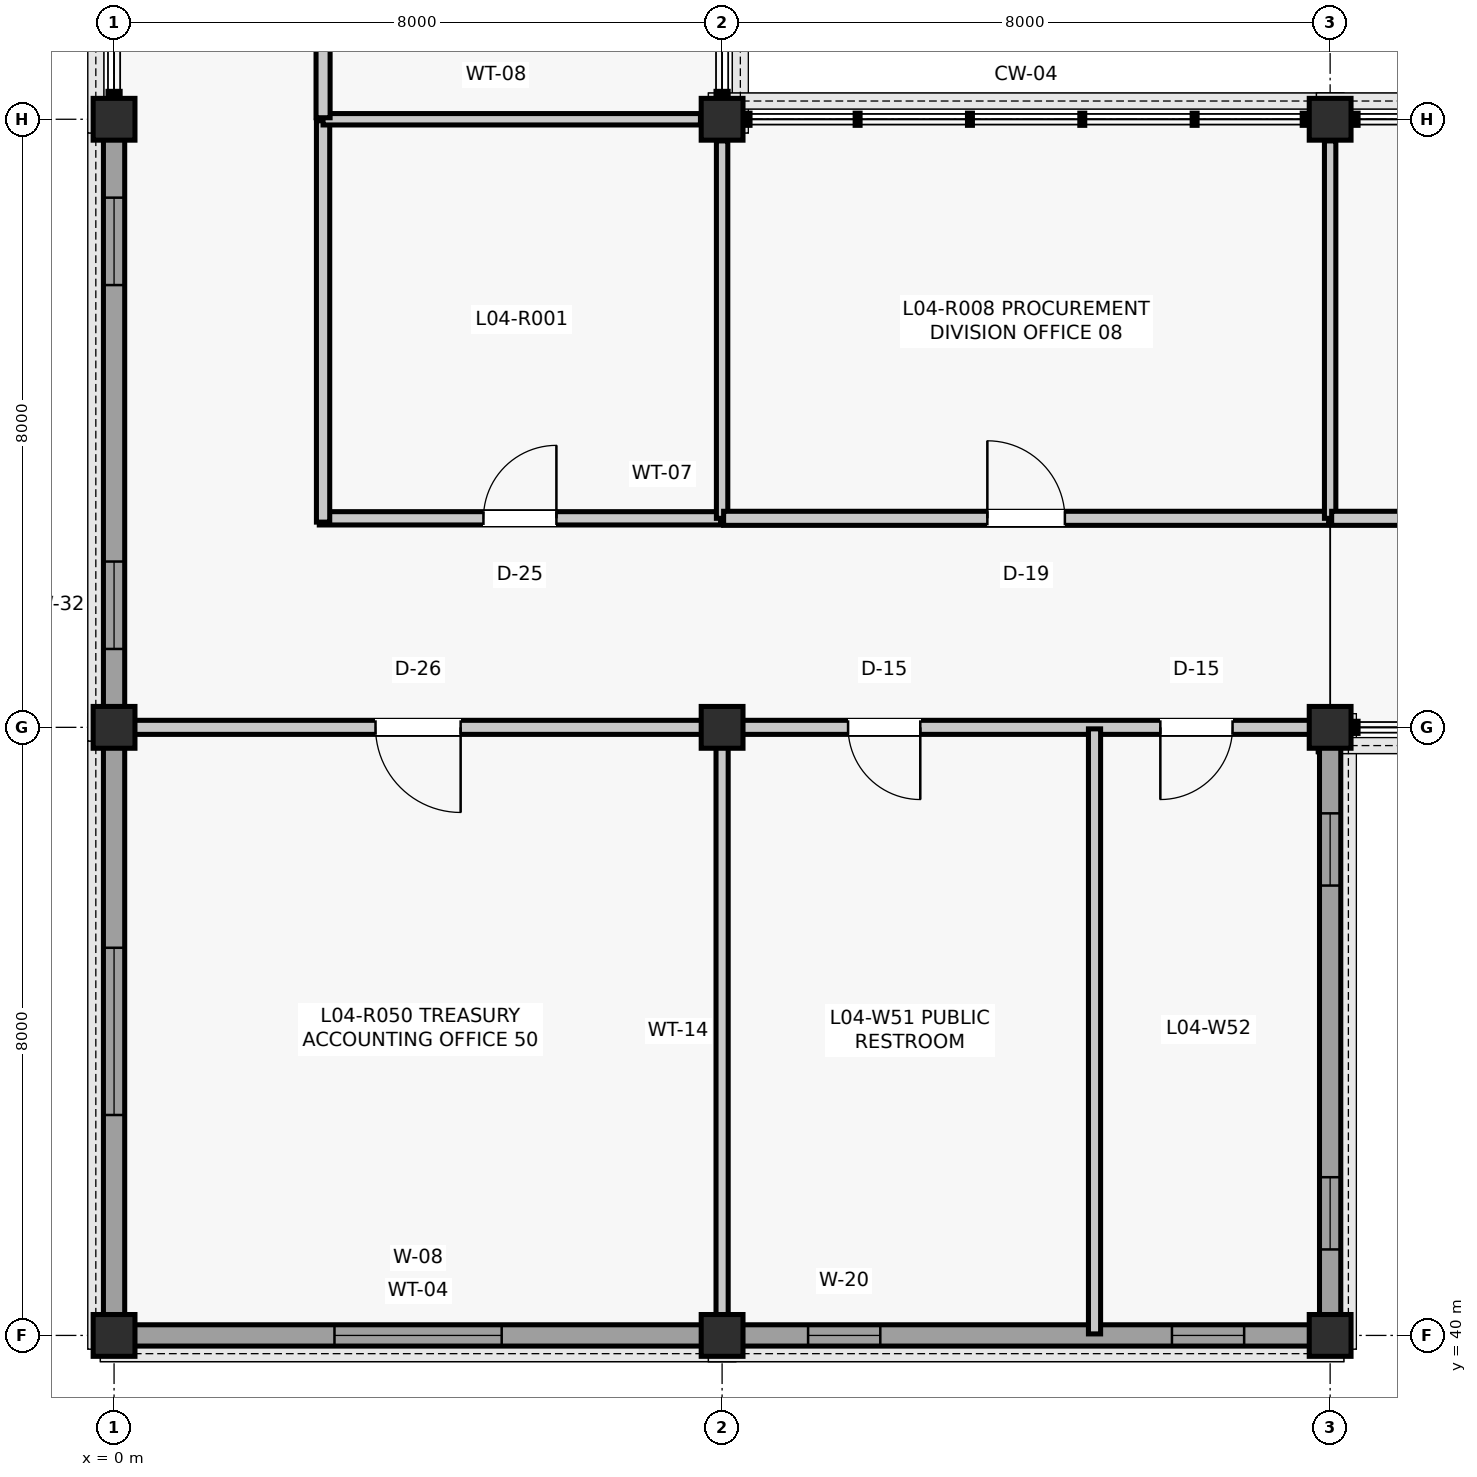
"""IFC4 building model, lengths in metres.
Left out: names, types, materials, properties, quantities, classifications, styles, units other than length and angle.
Written with IfcOpenShell. Run it as: python <this file> out.ifc"""

import sys

from ifc_helpers import new_model, si_unit, direction, frame, frame_2d, origin, origin_2d, place, context, subcontext, project, spatial, rectangle, extrude, element, fill, save


model = new_model("IFC4")
c1 = context("Model", 3, precision=1e-05, world=origin(), true_north=direction((0.0, 1.0)))
c2 = subcontext(c1, "Body", "Model", "MODEL_VIEW")
j1 = project(units=[si_unit("LENGTHUNIT", "METRE"), si_unit("PLANEANGLEUNIT", "RADIAN")], contexts=[c1])
p1 = place(None, origin())
s1 = spatial("IfcSite", under=j1, at=p1, CompositionType="ELEMENT")
p2 = place(p1, origin())
s2 = spatial("IfcBuilding", under=s1, at=p2, CompositionType="ELEMENT")
p3 = place(p2, frame((0.0, 0.0, 17.82)))
s3 = spatial("IfcBuildingStorey", under=s2, at=p3, CompositionType="ELEMENT", Elevation=17.82)
for number, where, z_axis, x_axis in (
    (1, (0.0, 40.0, 0.0), (0.0, 0.0, 1.0), (1.0, 0.0, 0.0)),
    (2, (0.0, 48.0, 0.0), (0.0, 0.0, 1.0), (1.0, 0.0, 0.0)),
    (3, (0.0, 56.0, 0.0), (0.0, 0.0, 1.0), (1.0, 0.0, 0.0)),
    (4, (8.0, 40.0, 0.0), (0.0, 0.0, 1.0), (1.0, 0.0, 0.0)),
    (5, (8.0, 48.0, 0.0), (0.0, 0.0, 1.0), (1.0, 0.0, 0.0)),
    (6, (8.0, 56.0, 0.0), (0.0, 0.0, 1.0), (1.0, 0.0, 0.0)),
    (7, (16.0, 40.0, 0.0), (0.0, 0.0, 1.0), (1.0, 0.0, 0.0)),
    (8, (16.0, 48.0, 0.0), (0.0, 0.0, 1.0), (1.0, 0.0, 0.0)),
    (9, (16.0, 56.0, 0.0), (0.0, 0.0, 1.0), (1.0, 0.0, 0.0)),
):
    element("IfcColumn", number, at=place(p3, frame(where, z_axis=z_axis, x_axis=x_axis)), inside=s3, PredefinedType="COLUMN", context=c2, shape_type="SweptSolid", body=[
        extrude(rectangle(XDim=0.55, YDim=0.55, at=origin_2d()), origin(), (0.0, 0.0, 1.0), 3.96),
    ])
p4 = place(p3, frame((0.26, 40.0, 0.0), z_axis=(0.0, 0.0, 1.0), x_axis=(1.0, 0.0, 0.0)))
e10 = element("IfcWall", 10, at=p4, inside=s3, PredefinedType="SOLIDWALL", context=c2, shape_type="SweptSolid", body=[
    extrude(rectangle(XDim=7.48, YDim=0.28, at=frame_2d((3.74, 0.0))), origin(), (0.0, 0.0, 1.0), 3.349),
])
p5 = place(p4, frame((2.64, 0.0, 0.9)))
e11 = element("IfcOpeningElement", 11, at=p5, cuts=e10, PredefinedType="OPENING", context=c2, shape_type="SweptSolid", body=[
    extrude(rectangle(XDim=2.2, YDim=2.0, at=frame_2d((1.1, 1.0))), frame((0.0, 0.15, 0.0), z_axis=(0.0, -1.0, 0.0), x_axis=(1.0, 0.0, 0.0)), (0.0, 0.0, 1.0), 0.3),
])
p6 = place(p3, frame((0.0, 40.26, 0.0), z_axis=(0.0, 0.0, 1.0), x_axis=(0.0, 1.0, 0.0)))
e12 = element("IfcWall", 12, at=p6, inside=s3, PredefinedType="SOLIDWALL", context=c2, shape_type="SweptSolid", body=[
    extrude(rectangle(XDim=7.48, YDim=0.28, at=frame_2d((3.74, 0.0))), origin(), (0.0, 0.0, 1.0), 3.349),
])
p7 = place(p6, frame((2.64, 0.0, 0.9)))
e13 = element("IfcOpeningElement", 13, at=p7, cuts=e12, PredefinedType="OPENING", context=c2, shape_type="SweptSolid", body=[
    extrude(rectangle(XDim=2.2, YDim=2.0, at=frame_2d((1.1, 1.0))), frame((0.0, 0.15, 0.0), z_axis=(0.0, -1.0, 0.0), x_axis=(1.0, 0.0, 0.0)), (0.0, 0.0, 1.0), 0.3),
])
p8 = place(p3, frame((0.0, 48.26, 0.0), z_axis=(0.0, 0.0, 1.0), x_axis=(0.0, 1.0, 0.0)))
e14 = element("IfcWall", 14, at=p8, inside=s3, PredefinedType="SOLIDWALL", context=c2, shape_type="SweptSolid", body=[
    extrude(rectangle(XDim=7.48, YDim=0.28, at=frame_2d((3.74, 0.0))), origin(), (0.0, 0.0, 1.0), 3.289),
])
p9 = place(p8, frame((0.771, 0.0, 0.95)))
e15 = element("IfcOpeningElement", 15, at=p9, cuts=e14, PredefinedType="OPENING", context=c2, shape_type="SweptSolid", body=[
    extrude(rectangle(XDim=1.15, YDim=1.65, at=frame_2d((0.575, 0.825))), frame((0.0, 0.15, 0.0), z_axis=(0.0, -1.0, 0.0), x_axis=(1.0, 0.0, 0.0)), (0.0, 0.0, 1.0), 0.3),
])
p10 = place(p8, frame((5.559, 0.0, 0.95)))
e16 = element("IfcOpeningElement", 16, at=p10, cuts=e14, PredefinedType="OPENING", context=c2, shape_type="SweptSolid", body=[
    extrude(rectangle(XDim=1.15, YDim=1.65, at=frame_2d((0.575, 0.825))), frame((0.0, 0.15, 0.0), z_axis=(0.0, -1.0, 0.0), x_axis=(1.0, 0.0, 0.0)), (0.0, 0.0, 1.0), 0.3),
])
p11 = place(p3, frame((8.26, 40.0, 0.0), z_axis=(0.0, 0.0, 1.0), x_axis=(1.0, 0.0, 0.0)))
e17 = element("IfcWall", 17, at=p11, inside=s3, PredefinedType="SOLIDWALL", context=c2, shape_type="SweptSolid", body=[
    extrude(rectangle(XDim=7.48, YDim=0.28, at=frame_2d((3.74, 0.0))), origin(), (0.0, 0.0, 1.0), 3.289),
])
p12 = place(p11, frame((0.871, 0.0, 1.2)))
e18 = element("IfcOpeningElement", 18, at=p12, cuts=e17, PredefinedType="OPENING", context=c2, shape_type="SweptSolid", body=[
    extrude(rectangle(XDim=0.95, YDim=1.4, at=frame_2d((0.475, 0.7))), frame((0.0, 0.15, 0.0), z_axis=(0.0, -1.0, 0.0), x_axis=(1.0, 0.0, 0.0)), (0.0, 0.0, 1.0), 0.3),
])
p13 = place(p11, frame((5.659, 0.0, 1.2)))
e19 = element("IfcOpeningElement", 19, at=p13, cuts=e17, PredefinedType="OPENING", context=c2, shape_type="SweptSolid", body=[
    extrude(rectangle(XDim=0.95, YDim=1.4, at=frame_2d((0.475, 0.7))), frame((0.0, 0.15, 0.0), z_axis=(0.0, -1.0, 0.0), x_axis=(1.0, 0.0, 0.0)), (0.0, 0.0, 1.0), 0.3),
])
p14 = place(p3, frame((16.0, 40.26, 0.0), z_axis=(0.0, 0.0, 1.0), x_axis=(0.0, 1.0, 0.0)))
e20 = element("IfcWall", 20, at=p14, inside=s3, PredefinedType="SOLIDWALL", context=c2, shape_type="SweptSolid", body=[
    extrude(rectangle(XDim=7.48, YDim=0.28, at=frame_2d((3.74, 0.0))), origin(), (0.0, 0.0, 1.0), 3.352),
])
p15 = place(p14, frame((0.871, 0.0, 1.2)))
e21 = element("IfcOpeningElement", 21, at=p15, cuts=e20, PredefinedType="OPENING", context=c2, shape_type="SweptSolid", body=[
    extrude(rectangle(XDim=0.95, YDim=1.4, at=frame_2d((0.475, 0.7))), frame((0.0, 0.15, 0.0), z_axis=(0.0, -1.0, 0.0), x_axis=(1.0, 0.0, 0.0)), (0.0, 0.0, 1.0), 0.3),
])
p16 = place(p14, frame((5.659, 0.0, 1.2)))
e22 = element("IfcOpeningElement", 22, at=p16, cuts=e20, PredefinedType="OPENING", context=c2, shape_type="SweptSolid", body=[
    extrude(rectangle(XDim=0.95, YDim=1.4, at=frame_2d((0.475, 0.7))), frame((0.0, 0.15, 0.0), z_axis=(0.0, -1.0, 0.0), x_axis=(1.0, 0.0, 0.0)), (0.0, 0.0, 1.0), 0.3),
])
p17 = place(p3, frame((2.7, 50.75, 0.0), z_axis=(0.0, 0.0, 1.0), x_axis=(1.0, 0.0, 0.0)))
e23 = element("IfcWall", 23, at=p17, inside=s3, PredefinedType="PARTITIONING", context=c2, shape_type="SweptSolid", body=[
    extrude(rectangle(XDim=5.28, YDim=0.175, at=frame_2d((2.64, 0.0))), origin(), (0.0, 0.0, 1.0), 3.238),
])
p18 = place(p17, frame((2.16, 0.0, 0.0)))
e24 = element("IfcOpeningElement", 24, at=p18, cuts=e23, PredefinedType="OPENING", context=c2, shape_type="SweptSolid", body=[
    extrude(rectangle(XDim=0.96, YDim=2.14, at=frame_2d((0.48, 1.07))), frame((0.0, 0.097, 0.0), z_axis=(0.0, -1.0, 0.0), x_axis=(1.0, 0.0, 0.0)), (0.0, 0.0, 1.0), 0.195),
])
p19 = place(p3, frame((2.75, 50.7, 0.0), z_axis=(0.0, 0.0, 1.0), x_axis=(0.0, 1.0, 0.0)))
e25 = element("IfcWall", 25, at=p19, inside=s3, PredefinedType="PARTITIONING", context=c2, shape_type="SweptSolid", body=[
    extrude(rectangle(XDim=5.28, YDim=0.175, at=frame_2d((2.64, 0.0))), origin(), (0.0, 0.0, 1.0), 3.385),
])
p20 = place(p3, frame((2.75, 56.0, 0.0), z_axis=(0.0, 0.0, 1.0), x_axis=(1.0, 0.0, 0.0)))
e26 = element("IfcWall", 26, at=p20, inside=s3, PredefinedType="PARTITIONING", context=c2, shape_type="SweptSolid", body=[
    extrude(rectangle(XDim=4.965, YDim=0.15, at=frame_2d((2.482, 0.0))), origin(), (0.0, 0.0, 1.0), 3.437),
])
p21 = place(p3, frame((8.0, 50.75, 0.0), z_axis=(0.0, 0.0, 1.0), x_axis=(0.0, 1.0, 0.0)))
e27 = element("IfcWall", 27, at=p21, inside=s3, PredefinedType="PARTITIONING", context=c2, shape_type="SweptSolid", body=[
    extrude(rectangle(XDim=4.965, YDim=0.15, at=frame_2d((2.482, 0.0))), origin(), (0.0, 0.0, 1.0), 3.238),
])
p22 = place(p3, frame((2.75, 56.02, 0.0), z_axis=(0.0, 0.0, 1.0), x_axis=(0.0, 1.0, 0.0)))
e28 = element("IfcWall", 28, at=p22, inside=s3, PredefinedType="PARTITIONING", context=c2, shape_type="SweptSolid", body=[
    extrude(rectangle(XDim=7.96, YDim=0.185, at=frame_2d((3.98, 0.0))), origin(), (0.0, 0.0, 1.0), 3.232),
])
p23 = place(p22, frame((3.42, 0.0, 0.0)))
e29 = element("IfcOpeningElement", 29, at=p23, cuts=e28, PredefinedType="OPENING", context=c2, shape_type="SweptSolid", body=[
    extrude(rectangle(XDim=1.12, YDim=2.22, at=frame_2d((0.56, 1.11))), frame((0.0, 0.103, 0.0), z_axis=(0.0, -1.0, 0.0), x_axis=(1.0, 0.0, 0.0)), (0.0, 0.0, 1.0), 0.205),
])
p24 = place(p3, frame((8.02, 50.75, 0.0), z_axis=(0.0, 0.0, 1.0), x_axis=(1.0, 0.0, 0.0)))
e30 = element("IfcWall", 30, at=p24, inside=s3, PredefinedType="PARTITIONING", context=c2, shape_type="SweptSolid", body=[
    extrude(rectangle(XDim=7.96, YDim=0.185, at=frame_2d((3.98, 0.0))), origin(), (0.0, 0.0, 1.0), 3.238),
])
p25 = place(p24, frame((3.47, 0.0, 0.0)))
e31 = element("IfcOpeningElement", 31, at=p25, cuts=e30, PredefinedType="OPENING", context=c2, shape_type="SweptSolid", body=[
    extrude(rectangle(XDim=1.02, YDim=2.2, at=frame_2d((0.51, 1.1))), frame((0.0, 0.103, 0.0), z_axis=(0.0, -1.0, 0.0), x_axis=(1.0, 0.0, 0.0)), (0.0, 0.0, 1.0), 0.205),
])
p26 = place(p3, frame((16.0, 50.75, 0.0), z_axis=(0.0, 0.0, 1.0), x_axis=(0.0, 1.0, 0.0)))
e32 = element("IfcWall", 32, at=p26, inside=s3, PredefinedType="PARTITIONING", context=c2, shape_type="SweptSolid", body=[
    extrude(rectangle(XDim=4.965, YDim=0.15, at=frame_2d((2.482, 0.0))), origin(), (0.0, 0.0, 1.0), 3.437),
])
p27 = place(p3, frame((16.02, 50.75, 0.0), z_axis=(0.0, 0.0, 1.0), x_axis=(1.0, 0.0, 0.0)))
e33 = element("IfcWall", 33, at=p27, inside=s3, PredefinedType="PARTITIONING", context=c2, shape_type="SweptSolid", body=[
    extrude(rectangle(XDim=7.96, YDim=0.185, at=frame_2d((3.98, 0.0))), origin(), (0.0, 0.0, 1.0), 3.232),
])
p28 = place(p27, frame((3.46, 0.0, 0.0)))
e34 = element("IfcOpeningElement", 34, at=p28, cuts=e33, PredefinedType="OPENING", context=c2, shape_type="SweptSolid", body=[
    extrude(rectangle(XDim=1.04, YDim=2.18, at=frame_2d((0.52, 1.09))), frame((0.0, 0.103, 0.0), z_axis=(0.0, -1.0, 0.0), x_axis=(1.0, 0.0, 0.0)), (0.0, 0.0, 1.0), 0.205),
])
p29 = place(p3, frame((8.0, 40.265, 0.0), z_axis=(0.0, 0.0, 1.0), x_axis=(0.0, 1.0, 0.0)))
e35 = element("IfcWall", 35, at=p29, inside=s3, PredefinedType="PARTITIONING", context=c2, shape_type="SweptSolid", body=[
    extrude(rectangle(XDim=7.47, YDim=0.16, at=frame_2d((3.735, 0.0))), origin(), (0.0, 0.0, 1.0), 3.232),
])
p30 = place(p3, frame((0.265, 48.0, 0.0), z_axis=(0.0, 0.0, 1.0), x_axis=(1.0, 0.0, 0.0)))
e36 = element("IfcWall", 36, at=p30, inside=s3, PredefinedType="PARTITIONING", context=c2, shape_type="SweptSolid", body=[
    extrude(rectangle(XDim=7.47, YDim=0.185, at=frame_2d((3.735, 0.0))), origin(), (0.0, 0.0, 1.0), 3.226),
])
p31 = place(p30, frame((3.175, 0.0, 0.0)))
e37 = element("IfcOpeningElement", 37, at=p31, cuts=e36, PredefinedType="OPENING", context=c2, shape_type="SweptSolid", body=[
    extrude(rectangle(XDim=1.12, YDim=2.22, at=frame_2d((0.56, 1.11))), frame((0.0, 0.103, 0.0), z_axis=(0.0, -1.0, 0.0), x_axis=(1.0, 0.0, 0.0)), (0.0, 0.0, 1.0), 0.205),
])
p32 = place(p3, frame((8.265, 48.0, 0.0), z_axis=(0.0, 0.0, 1.0), x_axis=(1.0, 0.0, 0.0)))
e38 = element("IfcWall", 38, at=p32, inside=s3, PredefinedType="PARTITIONING", context=c2, shape_type="SweptSolid", body=[
    extrude(rectangle(XDim=7.47, YDim=0.185, at=frame_2d((3.735, 0.0))), origin(), (0.0, 0.0, 1.0), 3.437),
])
p33 = place(p32, frame((1.393, 0.0, 0.0)))
e39 = element("IfcOpeningElement", 39, at=p33, cuts=e38, PredefinedType="OPENING", context=c2, shape_type="SweptSolid", body=[
    extrude(rectangle(XDim=0.95, YDim=2.1, at=frame_2d((0.475, 1.05))), frame((0.0, 0.103, 0.0), z_axis=(0.0, -1.0, 0.0), x_axis=(1.0, 0.0, 0.0)), (0.0, 0.0, 1.0), 0.205),
])
p34 = place(p32, frame((5.501, 0.0, 0.0)))
e40 = element("IfcOpeningElement", 40, at=p34, cuts=e38, PredefinedType="OPENING", context=c2, shape_type="SweptSolid", body=[
    extrude(rectangle(XDim=0.95, YDim=2.1, at=frame_2d((0.475, 1.05))), frame((0.0, 0.103, 0.0), z_axis=(0.0, -1.0, 0.0), x_axis=(1.0, 0.0, 0.0)), (0.0, 0.0, 1.0), 0.205),
])
p35 = place(p3, frame((12.9, 40.02, 0.0), z_axis=(0.0, 0.0, 1.0), x_axis=(0.0, 1.0, 0.0)))
e41 = element("IfcWall", 41, at=p35, inside=s3, PredefinedType="PARTITIONING", context=c2, shape_type="SweptSolid", body=[
    extrude(rectangle(XDim=7.96, YDim=0.16, at=frame_2d((3.98, 0.0))), origin(), (0.0, 0.0, 1.0), 3.282),
])
p36 = place(p5, origin())
e42 = element("IfcWindow", 42, at=p36, inside=s3, PartitioningType="SINGLE_PANEL", PredefinedType="WINDOW", context=c2, shape_type="SweptSolid", body=[
    extrude(rectangle(XDim=2.2, YDim=2.0, at=frame_2d((1.1, 1.0))), frame((0.0, 0.03, 0.0), z_axis=(0.0, -1.0, 0.0), x_axis=(1.0, 0.0, 0.0)), (0.0, 0.0, 1.0), 0.06),
])
fill(e11, e42)
p37 = place(p7, origin())
e43 = element("IfcWindow", 43, at=p37, inside=s3, PartitioningType="SINGLE_PANEL", PredefinedType="WINDOW", context=c2, shape_type="SweptSolid", body=[
    extrude(rectangle(XDim=2.2, YDim=2.0, at=frame_2d((1.1, 1.0))), frame((0.0, 0.03, 0.0), z_axis=(0.0, -1.0, 0.0), x_axis=(1.0, 0.0, 0.0)), (0.0, 0.0, 1.0), 0.06),
])
fill(e13, e43)
p38 = place(p9, origin())
e44 = element("IfcWindow", 44, at=p38, inside=s3, PartitioningType="SINGLE_PANEL", PredefinedType="WINDOW", context=c2, shape_type="SweptSolid", body=[
    extrude(rectangle(XDim=1.15, YDim=1.65, at=frame_2d((0.575, 0.825))), frame((0.0, 0.03, 0.0), z_axis=(0.0, -1.0, 0.0), x_axis=(1.0, 0.0, 0.0)), (0.0, 0.0, 1.0), 0.06),
])
fill(e15, e44)
p39 = place(p10, origin())
e45 = element("IfcWindow", 45, at=p39, inside=s3, PartitioningType="SINGLE_PANEL", PredefinedType="WINDOW", context=c2, shape_type="SweptSolid", body=[
    extrude(rectangle(XDim=1.15, YDim=1.65, at=frame_2d((0.575, 0.825))), frame((0.0, 0.03, 0.0), z_axis=(0.0, -1.0, 0.0), x_axis=(1.0, 0.0, 0.0)), (0.0, 0.0, 1.0), 0.06),
])
fill(e16, e45)
p40 = place(p12, origin())
e46 = element("IfcWindow", 46, at=p40, inside=s3, PartitioningType="SINGLE_PANEL", PredefinedType="WINDOW", context=c2, shape_type="SweptSolid", body=[
    extrude(rectangle(XDim=0.95, YDim=1.4, at=frame_2d((0.475, 0.7))), frame((0.0, 0.03, 0.0), z_axis=(0.0, -1.0, 0.0), x_axis=(1.0, 0.0, 0.0)), (0.0, 0.0, 1.0), 0.06),
])
fill(e18, e46)
p41 = place(p13, origin())
e47 = element("IfcWindow", 47, at=p41, inside=s3, PartitioningType="SINGLE_PANEL", PredefinedType="WINDOW", context=c2, shape_type="SweptSolid", body=[
    extrude(rectangle(XDim=0.95, YDim=1.4, at=frame_2d((0.475, 0.7))), frame((0.0, 0.03, 0.0), z_axis=(0.0, -1.0, 0.0), x_axis=(1.0, 0.0, 0.0)), (0.0, 0.0, 1.0), 0.06),
])
fill(e19, e47)
p42 = place(p15, origin())
e48 = element("IfcWindow", 48, at=p42, inside=s3, PartitioningType="SINGLE_PANEL", PredefinedType="WINDOW", context=c2, shape_type="SweptSolid", body=[
    extrude(rectangle(XDim=0.95, YDim=1.4, at=frame_2d((0.475, 0.7))), frame((0.0, 0.03, 0.0), z_axis=(0.0, -1.0, 0.0), x_axis=(1.0, 0.0, 0.0)), (0.0, 0.0, 1.0), 0.06),
])
fill(e21, e48)
p43 = place(p16, origin())
e49 = element("IfcWindow", 49, at=p43, inside=s3, PartitioningType="SINGLE_PANEL", PredefinedType="WINDOW", context=c2, shape_type="SweptSolid", body=[
    extrude(rectangle(XDim=0.95, YDim=1.4, at=frame_2d((0.475, 0.7))), frame((0.0, 0.03, 0.0), z_axis=(0.0, -1.0, 0.0), x_axis=(1.0, 0.0, 0.0)), (0.0, 0.0, 1.0), 0.06),
])
fill(e22, e49)
p44 = place(p18, origin())
e50 = element("IfcDoor", 50, at=p44, inside=s3, OperationType="SINGLE_SWING_RIGHT", PredefinedType="DOOR", context=c2, shape_type="SweptSolid", body=[
    extrude(rectangle(XDim=0.96, YDim=2.14, at=frame_2d((0.48, 1.07))), frame((0.0, 0.025, 0.0), z_axis=(0.0, -1.0, 0.0), x_axis=(1.0, 0.0, 0.0)), (0.0, 0.0, 1.0), 0.05),
])
fill(e24, e50)
p45 = place(p25, origin())
e51 = element("IfcDoor", 51, at=p45, inside=s3, OperationType="SINGLE_SWING_LEFT", PredefinedType="DOOR", context=c2, shape_type="SweptSolid", body=[
    extrude(rectangle(XDim=1.02, YDim=2.2, at=frame_2d((0.51, 1.1))), frame((0.0, 0.025, 0.0), z_axis=(0.0, -1.0, 0.0), x_axis=(1.0, 0.0, 0.0)), (0.0, 0.0, 1.0), 0.05),
])
fill(e31, e51)
p46 = place(p31, frame((1.12, 0.0, 0.0), z_axis=(0.0, 0.0, 1.0), x_axis=(-1.0, 0.0, 0.0)))
e52 = element("IfcDoor", 52, at=p46, inside=s3, OperationType="SINGLE_SWING_RIGHT", PredefinedType="DOOR", context=c2, shape_type="SweptSolid", body=[
    extrude(rectangle(XDim=1.12, YDim=2.22, at=frame_2d((0.56, 1.11))), frame((0.0, 0.025, 0.0), z_axis=(0.0, -1.0, 0.0), x_axis=(1.0, 0.0, 0.0)), (0.0, 0.0, 1.0), 0.05),
])
fill(e37, e52)
p47 = place(p33, frame((0.95, 0.0, 0.0), z_axis=(0.0, 0.0, 1.0), x_axis=(-1.0, 0.0, 0.0)))
e53 = element("IfcDoor", 53, at=p47, inside=s3, OperationType="SINGLE_SWING_RIGHT", PredefinedType="DOOR", context=c2, shape_type="SweptSolid", body=[
    extrude(rectangle(XDim=0.95, YDim=2.1, at=frame_2d((0.475, 1.05))), frame((0.0, 0.025, 0.0), z_axis=(0.0, -1.0, 0.0), x_axis=(1.0, 0.0, 0.0)), (0.0, 0.0, 1.0), 0.05),
])
fill(e39, e53)
p48 = place(p34, frame((0.95, 0.0, 0.0), z_axis=(0.0, 0.0, 1.0), x_axis=(-1.0, 0.0, 0.0)))
e54 = element("IfcDoor", 54, at=p48, inside=s3, OperationType="SINGLE_SWING_LEFT", PredefinedType="DOOR", context=c2, shape_type="SweptSolid", body=[
    extrude(rectangle(XDim=0.95, YDim=2.1, at=frame_2d((0.475, 1.05))), frame((0.0, 0.025, 0.0), z_axis=(0.0, -1.0, 0.0), x_axis=(1.0, 0.0, 0.0)), (0.0, 0.0, 1.0), 0.05),
])
fill(e40, e54)
save(model, sys.argv[1])
